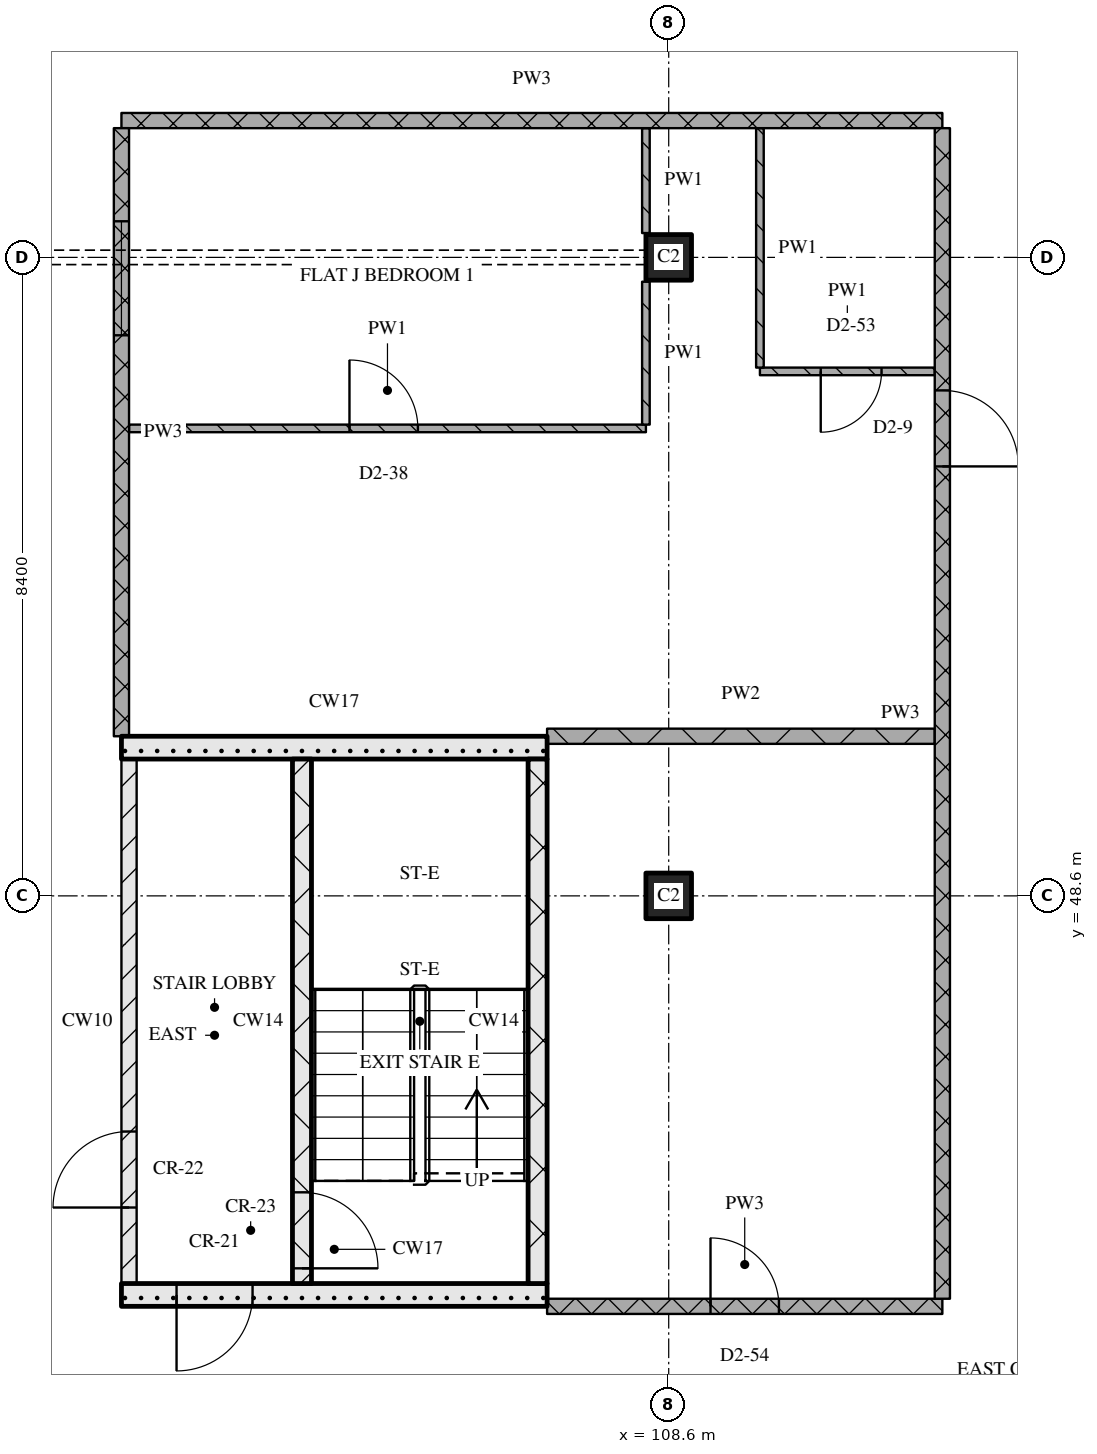
"""IFC4 building model, lengths in metres.
Left out: names, types, materials, properties, quantities, classifications, styles, units other than length and angle.
Written with IfcOpenShell. Run it as: python <this file> out.ifc"""

import sys

from ifc_helpers import new_model, si_unit, direction, frame, frame_2d, origin, origin_2d, place, context, subcontext, project, spatial, rectangle, extrude, element, fill, save


model = new_model("IFC4")
c1 = context("Model", 3, precision=1e-05, world=origin(), true_north=direction((0.0, 1.0)))
c2 = subcontext(c1, "Body", "Model", "MODEL_VIEW")
j1 = project(units=[si_unit("LENGTHUNIT", "METRE"), si_unit("PLANEANGLEUNIT", "RADIAN")], contexts=[c1])
p1 = place(None, origin())
s1 = spatial("IfcSite", under=j1, at=p1, CompositionType="ELEMENT")
p2 = place(p1, origin())
s2 = spatial("IfcBuilding", under=s1, at=p2, CompositionType="ELEMENT")
p3 = place(p2, frame((0.0, 0.0, 216.3)))
s3 = spatial("IfcBuildingStorey", under=s2, at=p3, CompositionType="ELEMENT", Elevation=216.3)
for number, where, z_axis, x_axis in (
    (1, (108.6, 48.6, 0.0), (0.0, 0.0, 1.0), (1.0, 0.0, 0.0)),
    (2, (108.6, 57.0, 0.0), (0.0, 0.0, 1.0), (1.0, 0.0, 0.0)),
):
    element("IfcColumn", number, at=place(p3, frame(where, z_axis=z_axis, x_axis=x_axis)), inside=s3, PredefinedType="COLUMN", context=c2, shape_type="SweptSolid", body=[
        extrude(rectangle(XDim=0.6, YDim=0.6, at=origin_2d()), origin(), (0.0, 0.0, 1.0), 3.6),
    ])
p4 = place(p3, frame((101.4, 43.35, 0.0), z_axis=(0.0, 0.0, 1.0), x_axis=(1.0, 0.0, 0.0)))
e3 = element("IfcWall", 3, at=p4, inside=s3, PredefinedType="SOLIDWALL", context=c2, shape_type="SweptSolid", body=[
    extrude(rectangle(XDim=5.6, YDim=0.3, at=frame_2d((2.8, 0.0))), origin(), (0.0, 0.0, 1.0), 3.32),
])
p5 = place(p4, frame((0.725, 0.0, 0.0)))
e4 = element("IfcOpeningElement", 4, at=p5, cuts=e3, PredefinedType="OPENING", context=c2, shape_type="SweptSolid", body=[
    extrude(rectangle(XDim=1.0, YDim=2.1, at=frame_2d((0.5, 1.05))), frame((0.0, 0.16, 0.0), z_axis=(0.0, -1.0, 0.0), x_axis=(1.0, 0.0, 0.0)), (0.0, 0.0, 1.0), 0.32),
])
p6 = place(p3, frame((101.5, 43.5, 0.0), z_axis=(0.0, 0.0, 1.0), x_axis=(0.0, 1.0, 0.0)))
e5 = element("IfcWall", 5, at=p6, inside=s3, PredefinedType="PARTITIONING", context=c2, shape_type="SweptSolid", body=[
    extrude(rectangle(XDim=6.9, YDim=0.2, at=frame_2d((3.45, 0.0))), origin(), (0.0, 0.0, 1.0), 3.32),
])
p7 = place(p6, frame((1.0, 0.0, 0.0)))
e6 = element("IfcOpeningElement", 6, at=p7, cuts=e5, PredefinedType="OPENING", context=c2, shape_type="SweptSolid", body=[
    extrude(rectangle(XDim=1.0, YDim=2.1, at=frame_2d((0.5, 1.05))), frame((0.0, 0.11, 0.0), z_axis=(0.0, -1.0, 0.0), x_axis=(1.0, 0.0, 0.0)), (0.0, 0.0, 1.0), 0.22),
])
p8 = place(p3, frame((103.775, 43.5, 0.0), z_axis=(0.0, 0.0, 1.0), x_axis=(0.0, 1.0, 0.0)))
e7 = element("IfcWall", 7, at=p8, inside=s3, PredefinedType="SOLIDWALL", context=c2, shape_type="SweptSolid", body=[
    extrude(rectangle(XDim=6.9, YDim=0.25, at=frame_2d((3.45, 0.0))), origin(), (0.0, 0.0, 1.0), 3.32),
])
p9 = place(p8, frame((0.2, 0.0, 0.0)))
e8 = element("IfcOpeningElement", 8, at=p9, cuts=e7, PredefinedType="OPENING", context=c2, shape_type="SweptSolid", body=[
    extrude(rectangle(XDim=1.0, YDim=2.1, at=frame_2d((0.5, 1.05))), frame((0.0, 0.135, 0.0), z_axis=(0.0, -1.0, 0.0), x_axis=(1.0, 0.0, 0.0)), (0.0, 0.0, 1.0), 0.27),
])
p10 = place(p3, frame((106.875, 43.5, 0.0), z_axis=(0.0, 0.0, 1.0), x_axis=(0.0, 1.0, 0.0)))
e9 = element("IfcWall", 9, at=p10, inside=s3, PredefinedType="SOLIDWALL", context=c2, shape_type="SweptSolid", body=[
    extrude(rectangle(XDim=6.9, YDim=0.25, at=frame_2d((3.45, 0.0))), origin(), (0.0, 0.0, 1.0), 3.32),
])
p11 = place(p3, frame((101.4, 50.55, 0.0), z_axis=(0.0, 0.0, 1.0), x_axis=(1.0, 0.0, 0.0)))
e10 = element("IfcWall", 10, at=p11, inside=s3, PredefinedType="SOLIDWALL", context=c2, shape_type="SweptSolid", body=[
    extrude(rectangle(XDim=5.6, YDim=0.3, at=frame_2d((2.8, 0.0))), origin(), (0.0, 0.0, 1.0), 3.32),
])
p12 = place(p3, frame((107.0, 43.2, 0.0), z_axis=(0.0, 0.0, 1.0), x_axis=(1.0, 0.0, 0.0)))
e11 = element("IfcWall", 11, at=p12, inside=s3, PredefinedType="PARTITIONING", context=c2, shape_type="SweptSolid", body=[
    extrude(rectangle(XDim=5.2, YDim=0.2, at=frame_2d((2.6, 0.0))), origin(), (0.0, 0.0, 1.0), 3.32),
])
p13 = place(p12, frame((2.15, 0.0, 0.0)))
e12 = element("IfcOpeningElement", 12, at=p13, cuts=e11, PredefinedType="OPENING", context=c2, shape_type="SweptSolid", body=[
    extrude(rectangle(XDim=0.9, YDim=2.1, at=frame_2d((0.45, 1.05))), frame((0.0, 0.11, 0.0), z_axis=(0.0, -1.0, 0.0), x_axis=(1.0, 0.0, 0.0)), (0.0, 0.0, 1.0), 0.22),
])
p14 = place(p3, frame((107.0, 50.7, 0.0), z_axis=(0.0, 0.0, 1.0), x_axis=(1.0, 0.0, 0.0)))
e13 = element("IfcWall", 13, at=p14, inside=s3, PredefinedType="PARTITIONING", context=c2, shape_type="SweptSolid", body=[
    extrude(rectangle(XDim=5.1, YDim=0.2, at=frame_2d((2.55, 0.0))), origin(), (0.0, 0.0, 1.0), 3.32),
])
p15 = place(p3, frame((101.5, 54.75, 0.0), z_axis=(0.0, 0.0, 1.0), x_axis=(1.0, 0.0, 0.0)))
e14 = element("IfcWall", 14, at=p15, inside=s3, PredefinedType="PARTITIONING", context=c2, shape_type="SweptSolid", body=[
    extrude(rectangle(XDim=6.8, YDim=0.1, at=frame_2d((3.4, 0.0))), origin(), (0.0, 0.0, 1.0), 3.32),
])
p16 = place(p15, frame((2.9, 0.0, 0.0)))
e15 = element("IfcOpeningElement", 15, at=p16, cuts=e14, PredefinedType="OPENING", context=c2, shape_type="SweptSolid", body=[
    extrude(rectangle(XDim=0.9, YDim=2.1, at=frame_2d((0.45, 1.05))), frame((0.0, 0.06, 0.0), z_axis=(0.0, -1.0, 0.0), x_axis=(1.0, 0.0, 0.0)), (0.0, 0.0, 1.0), 0.12),
])
p17 = place(p3, frame((109.8, 55.5, 0.0), z_axis=(0.0, 0.0, 1.0), x_axis=(1.0, 0.0, 0.0)))
e16 = element("IfcWall", 16, at=p17, inside=s3, PredefinedType="PARTITIONING", context=c2, shape_type="SweptSolid", body=[
    extrude(rectangle(XDim=2.3, YDim=0.1, at=frame_2d((1.15, 0.0))), origin(), (0.0, 0.0, 1.0), 3.32),
])
p18 = place(p17, frame((0.8, 0.0, 0.0)))
e17 = element("IfcOpeningElement", 17, at=p18, cuts=e16, PredefinedType="OPENING", context=c2, shape_type="SweptSolid", body=[
    extrude(rectangle(XDim=0.8, YDim=2.1, at=frame_2d((0.4, 1.05))), frame((0.0, 0.06, 0.0), z_axis=(0.0, -1.0, 0.0), x_axis=(1.0, 0.0, 0.0)), (0.0, 0.0, 1.0), 0.12),
])
p19 = place(p3, frame((101.4, 58.8, 0.0), z_axis=(0.0, 0.0, 1.0), x_axis=(1.0, 0.0, 0.0)))
e18 = element("IfcWall", 18, at=p19, inside=s3, PredefinedType="PARTITIONING", context=c2, shape_type="SweptSolid", body=[
    extrude(rectangle(XDim=10.8, YDim=0.2, at=frame_2d((5.4, 0.0))), origin(), (0.0, 0.0, 1.0), 3.32),
])
p20 = place(p3, frame((101.4, 58.7, 0.0), z_axis=(0.0, 0.0, 1.0), x_axis=(0.0, -1.0, 0.0)))
e19 = element("IfcWall", 19, at=p20, inside=s3, PredefinedType="PARTITIONING", context=c2, shape_type="SweptSolid", body=[
    extrude(rectangle(XDim=8.0, YDim=0.2, at=frame_2d((4.0, 0.0))), origin(), (0.0, 0.0, 1.0), 3.32),
])
p21 = place(p20, frame((1.225, 0.0, 0.9)))
e20 = element("IfcOpeningElement", 20, at=p21, cuts=e19, PredefinedType="OPENING", context=c2, shape_type="SweptSolid", body=[
    extrude(rectangle(XDim=1.5, YDim=1.5, at=frame_2d((0.75, 0.75))), frame((0.0, 0.11, 0.0), z_axis=(0.0, -1.0, 0.0), x_axis=(1.0, 0.0, 0.0)), (0.0, 0.0, 1.0), 0.22),
])
p22 = place(p3, frame((108.3, 56.68, 0.0), z_axis=(0.0, 0.0, 1.0), x_axis=(0.0, -1.0, 0.0)))
e21 = element("IfcWall", 21, at=p22, inside=s3, PredefinedType="PARTITIONING", context=c2, shape_type="SweptSolid", body=[
    extrude(rectangle(XDim=1.88, YDim=0.1, at=frame_2d((0.94, 0.0))), origin(), (0.0, 0.0, 1.0), 3.32),
])
p23 = place(p3, frame((108.3, 58.7, 0.0), z_axis=(0.0, 0.0, 1.0), x_axis=(0.0, -1.0, 0.0)))
e22 = element("IfcWall", 22, at=p23, inside=s3, PredefinedType="PARTITIONING", context=c2, shape_type="SweptSolid", body=[
    extrude(rectangle(XDim=1.38, YDim=0.1, at=frame_2d((0.69, 0.0))), origin(), (0.0, 0.0, 1.0), 3.32),
])
p24 = place(p3, frame((109.8, 58.7, 0.0), z_axis=(0.0, 0.0, 1.0), x_axis=(0.0, -1.0, 0.0)))
e23 = element("IfcWall", 23, at=p24, inside=s3, PredefinedType="PARTITIONING", context=c2, shape_type="SweptSolid", body=[
    extrude(rectangle(XDim=3.15, YDim=0.1, at=frame_2d((1.575, 0.0))), origin(), (0.0, 0.0, 1.0), 3.32),
])
p25 = place(p3, frame((112.2, 43.3, 0.0), z_axis=(0.0, 0.0, 1.0), x_axis=(0.0, 1.0, 0.0)))
e24 = element("IfcWall", 24, at=p25, inside=s3, PredefinedType="PARTITIONING", context=c2, shape_type="SweptSolid", body=[
    extrude(rectangle(XDim=15.4, YDim=0.2, at=frame_2d((7.7, 0.0))), origin(), (0.0, 0.0, 1.0), 3.32),
])
p26 = place(p25, frame((10.95, 0.0, 0.0)))
e25 = element("IfcOpeningElement", 25, at=p26, cuts=e24, PredefinedType="OPENING", context=c2, shape_type="SweptSolid", body=[
    extrude(rectangle(XDim=1.0, YDim=2.1, at=frame_2d((0.5, 1.05))), frame((0.0, 0.11, 0.0), z_axis=(0.0, -1.0, 0.0), x_axis=(1.0, 0.0, 0.0)), (0.0, 0.0, 1.0), 0.22),
])
p27 = place(p5, origin())
e26 = element("IfcDoor", 26, at=p27, inside=s3, OperationType="SINGLE_SWING_RIGHT", PredefinedType="DOOR", context=c2, shape_type="SweptSolid", body=[
    extrude(rectangle(XDim=1.0, YDim=2.1, at=frame_2d((0.5, 1.05))), frame((0.0, 0.025, 0.0), z_axis=(0.0, -1.0, 0.0), x_axis=(1.0, 0.0, 0.0)), (0.0, 0.0, 1.0), 0.05),
])
fill(e4, e26)
p28 = place(p9, origin())
e27 = element("IfcDoor", 27, at=p28, inside=s3, OperationType="SINGLE_SWING_RIGHT", PredefinedType="DOOR", context=c2, shape_type="SweptSolid", body=[
    extrude(rectangle(XDim=1.0, YDim=2.1, at=frame_2d((0.5, 1.05))), frame((0.0, 0.025, 0.0), z_axis=(0.0, -1.0, 0.0), x_axis=(1.0, 0.0, 0.0)), (0.0, 0.0, 1.0), 0.05),
])
fill(e8, e27)
p29 = place(p7, origin())
e28 = element("IfcDoor", 28, at=p29, inside=s3, OperationType="SINGLE_SWING_LEFT", PredefinedType="DOOR", context=c2, shape_type="SweptSolid", body=[
    extrude(rectangle(XDim=1.0, YDim=2.1, at=frame_2d((0.5, 1.05))), frame((0.0, 0.025, 0.0), z_axis=(0.0, -1.0, 0.0), x_axis=(1.0, 0.0, 0.0)), (0.0, 0.0, 1.0), 0.05),
])
fill(e6, e28)
p30 = place(p13, origin())
e29 = element("IfcDoor", 29, at=p30, inside=s3, OperationType="SINGLE_SWING_LEFT", PredefinedType="DOOR", context=c2, shape_type="SweptSolid", body=[
    extrude(rectangle(XDim=0.9, YDim=2.1, at=frame_2d((0.45, 1.05))), frame((0.0, 0.025, 0.0), z_axis=(0.0, -1.0, 0.0), x_axis=(1.0, 0.0, 0.0)), (0.0, 0.0, 1.0), 0.05),
])
fill(e12, e29)
p31 = place(p16, origin())
e30 = element("IfcDoor", 30, at=p31, inside=s3, OperationType="SINGLE_SWING_LEFT", PredefinedType="DOOR", context=c2, shape_type="SweptSolid", body=[
    extrude(rectangle(XDim=0.9, YDim=2.1, at=frame_2d((0.45, 1.05))), frame((0.0, 0.025, 0.0), z_axis=(0.0, -1.0, 0.0), x_axis=(1.0, 0.0, 0.0)), (0.0, 0.0, 1.0), 0.05),
])
fill(e15, e30)
p32 = place(p18, origin())
e31 = element("IfcDoor", 31, at=p32, inside=s3, OperationType="SINGLE_SWING_RIGHT", PredefinedType="DOOR", context=c2, shape_type="SweptSolid", body=[
    extrude(rectangle(XDim=0.8, YDim=2.1, at=frame_2d((0.4, 1.05))), frame((0.0, 0.025, 0.0), z_axis=(0.0, -1.0, 0.0), x_axis=(1.0, 0.0, 0.0)), (0.0, 0.0, 1.0), 0.05),
])
fill(e17, e31)
p33 = place(p26, origin())
e32 = element("IfcDoor", 32, at=p33, inside=s3, OperationType="SINGLE_SWING_RIGHT", PredefinedType="DOOR", context=c2, shape_type="SweptSolid", body=[
    extrude(rectangle(XDim=1.0, YDim=2.1, at=frame_2d((0.5, 1.05))), frame((0.0, 0.025, 0.0), z_axis=(0.0, -1.0, 0.0), x_axis=(1.0, 0.0, 0.0)), (0.0, 0.0, 1.0), 0.05),
])
fill(e25, e32)
p34 = place(p21, origin())
e33 = element("IfcWindow", 33, at=p34, inside=s3, PartitioningType="SINGLE_PANEL", PredefinedType="WINDOW", context=c2, shape_type="SweptSolid", body=[
    extrude(rectangle(XDim=1.5, YDim=1.5, at=frame_2d((0.75, 0.75))), frame((0.0, 0.03, 0.0), z_axis=(0.0, -1.0, 0.0), x_axis=(1.0, 0.0, 0.0)), (0.0, 0.0, 1.0), 0.06),
])
fill(e20, e33)
save(model, sys.argv[1])
